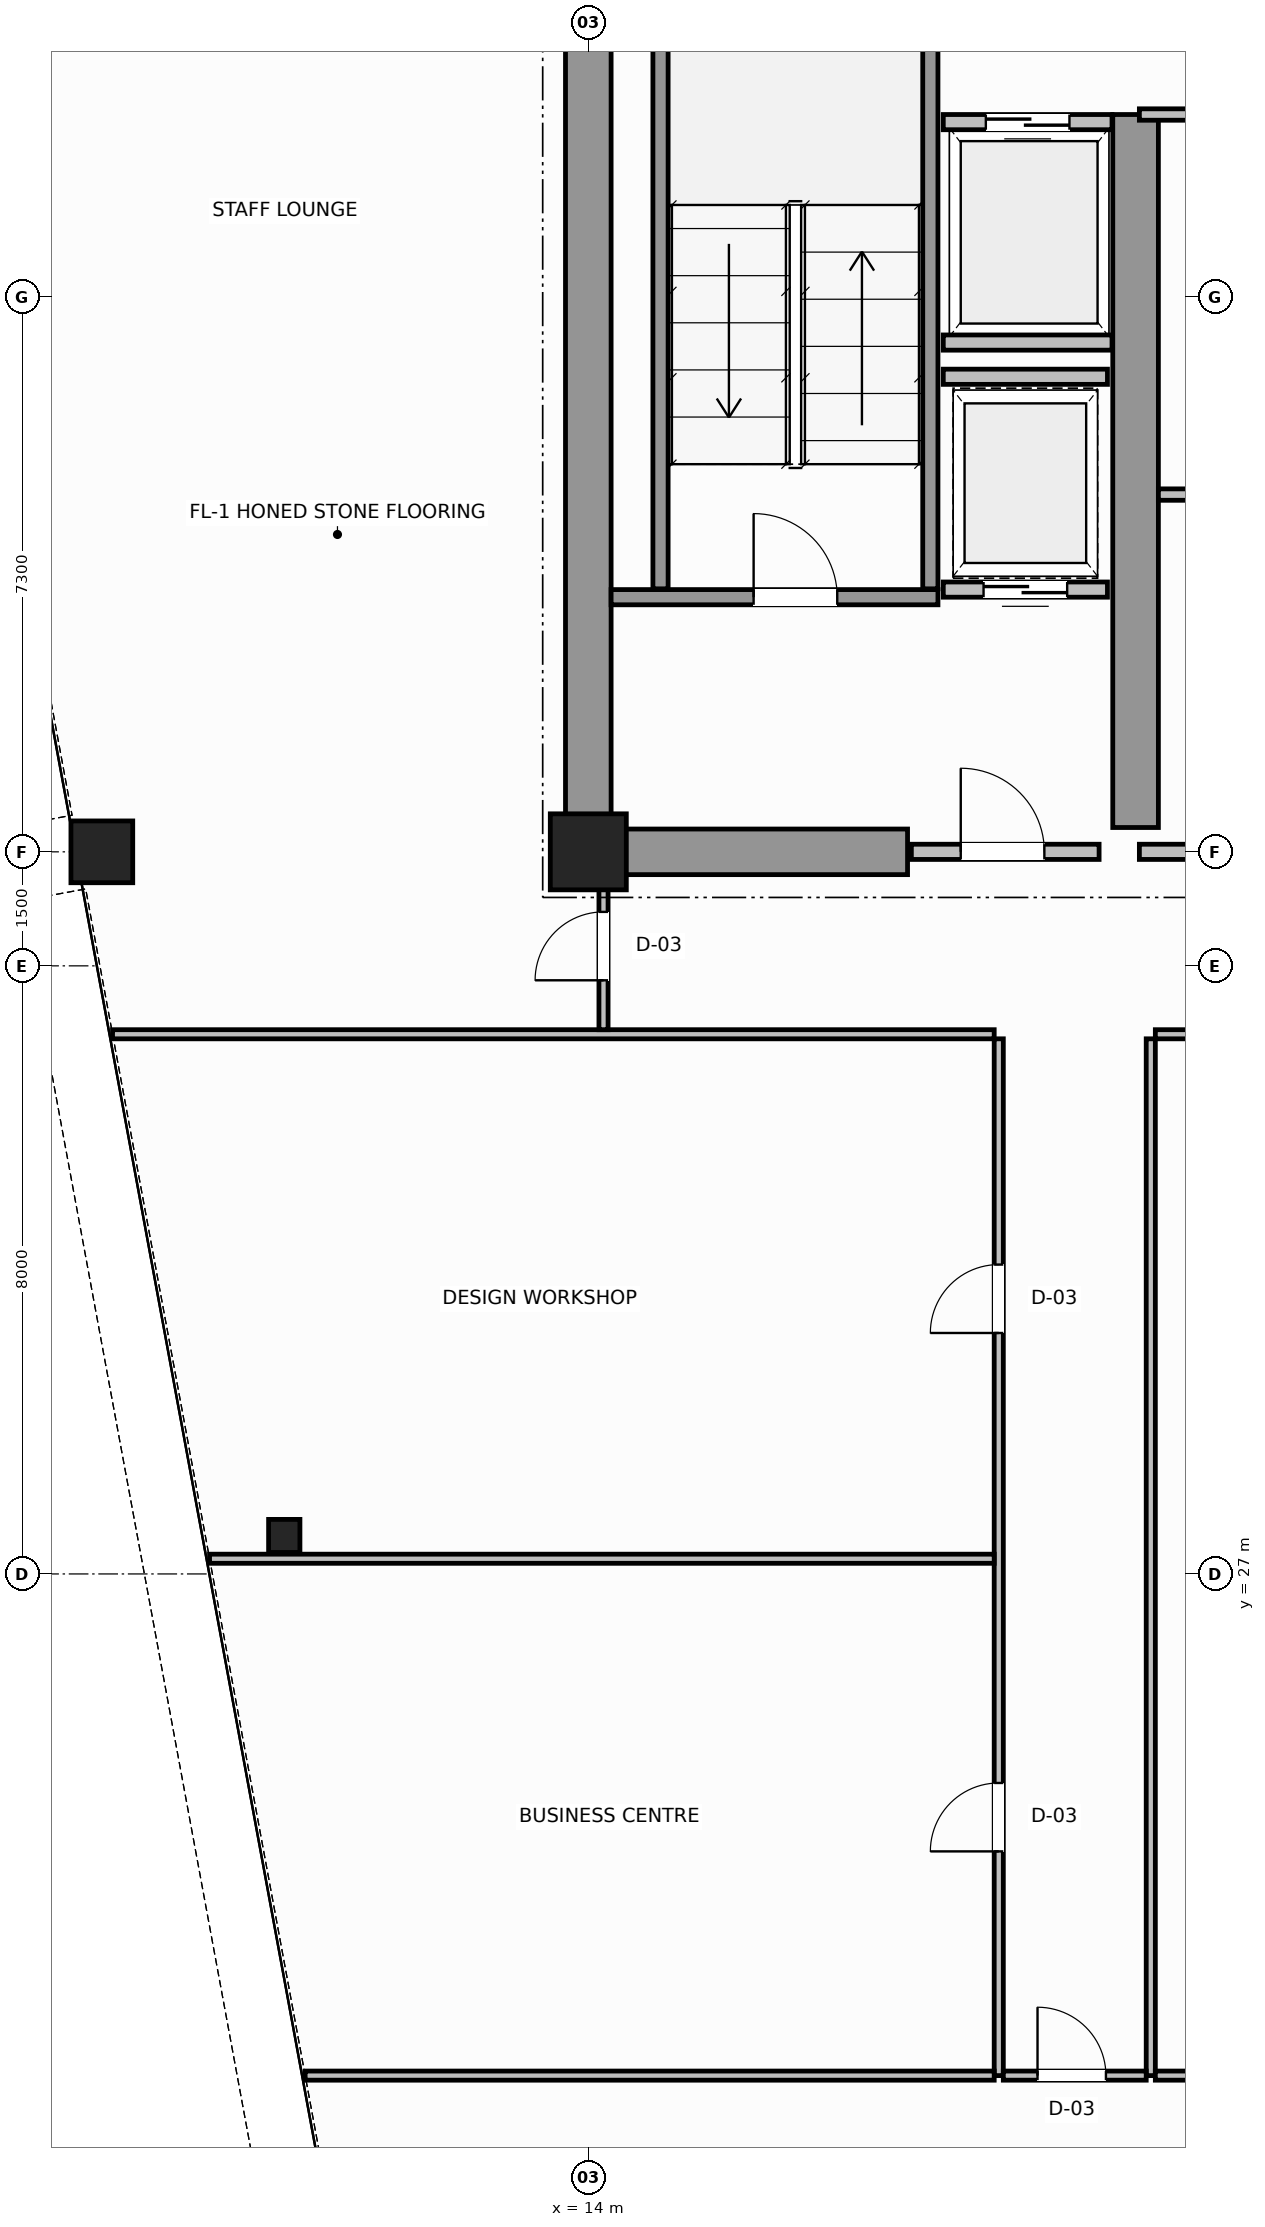
"""IFC4 building model, lengths in metres.
Left out: names, types, materials, properties, quantities, classifications, styles, units other than length and angle.
Written with IfcOpenShell. Run it as: python <this file> out.ifc"""

import sys

from ifc_helpers import new_model, si_unit, direction, frame, frame_2d, origin, origin_2d, place, context, subcontext, project, spatial, rectangle, hollow_circle, i_section, extrude, source, transform, mapped, element, fill, save


model = new_model("IFC4")
c1 = context("Model", 3, precision=1e-05, world=origin(), true_north=direction((0.0, 1.0)))
c2 = subcontext(c1, "Body", "Model", "MODEL_VIEW")
j1 = project(units=[si_unit("LENGTHUNIT", "METRE"), si_unit("PLANEANGLEUNIT", "RADIAN")], contexts=[c1])
p1 = place(None, origin())
s1 = spatial("IfcSite", under=j1, at=p1, CompositionType="ELEMENT")
p2 = place(p1, origin())
s2 = spatial("IfcBuilding", under=s1, at=p2, CompositionType="ELEMENT")
p3 = place(p2, frame((0.0, 0.0, 210.8)))
s3 = spatial("IfcBuildingStorey", under=s2, at=p3, CompositionType="ELEMENT", Elevation=210.8)
m1 = source(origin(), c2, "Body", "SweptSolid", [
    extrude(rectangle(XDim=1.0, YDim=1.0, at=origin_2d()), origin(), (0.0, 0.0, 1.0), 3.8),
])
p4 = place(p3, frame((14.0, 36.5, 0.0), z_axis=(0.0, 0.0, 1.0), x_axis=(1.0, 0.0, 0.0)))
e1 = element("IfcColumn", 1, at=p4, inside=s3, PredefinedType="COLUMN", context=c2, shape_type="MappedRepresentation", body=[
    mapped(m1, transform((0.0, 0.0, 0.0), scale=1.0)),
])
m2 = source(origin(), c2, "Body", "SweptSolid", [
    extrude(hollow_circle(Radius=0.406, WallThickness=0.04, at=origin_2d()), origin(), (0.0, 0.0, 1.0), 3.8),
])
p5 = place(p3, frame((7.6, 36.5, 0.0), z_axis=(0.0, 0.0, 1.0), x_axis=(1.0, 0.0, 0.0)))
e2 = element("IfcColumn", 2, at=p5, inside=s3, PredefinedType="COLUMN", context=c2, shape_type="MappedRepresentation", body=[
    mapped(m2, transform((0.0, 0.0, 0.0), scale=1.0)),
])
m3 = source(origin(), c2, "Body", "SweptSolid", [
    extrude(i_section(OverallWidth=0.412, OverallDepth=0.435, WebThickness=0.036, FlangeThickness=0.05, FilletRadius=0.015, at=origin_2d()), origin(), (0.0, 0.0, 1.0), 3.8),
])
p6 = place(p3, frame((10.0, 27.5, 0.0), z_axis=(0.0, 0.0, 1.0), x_axis=(1.0, 0.0, 0.0)))
e3 = element("IfcColumn", 3, at=p6, inside=s3, PredefinedType="COLUMN", context=c2, shape_type="MappedRepresentation", body=[
    mapped(m3, transform((0.0, 0.0, 0.0), scale=1.0)),
])
p7 = place(p3, frame((14.0, 36.5, 0.0), z_axis=(0.0, 0.0, 1.0), x_axis=(0.0, 1.0, 0.0)))
e4 = element("IfcWall", 4, at=p7, inside=s3, PredefinedType="SHEAR", context=c2, shape_type="SweptSolid", body=[
    extrude(rectangle(XDim=14.5, YDim=0.6, at=frame_2d((7.25, 0.0))), origin(), (0.0, 0.0, 1.0), 3.8),
])
p8 = place(p3, frame((14.32, 36.5, 0.0), z_axis=(0.0, 0.0, 1.0), x_axis=(1.0, 0.0, 0.0)))
e5 = element("IfcWall", 5, at=p8, inside=s3, PredefinedType="SHEAR", context=c2, shape_type="SweptSolid", body=[
    extrude(rectangle(XDim=3.88, YDim=0.6, at=frame_2d((1.94, 0.0))), origin(), (0.0, 0.0, 1.0), 2.58),
])
p9 = place(p3, frame((21.2, 36.82, 0.0), z_axis=(0.0, 0.0, 1.0), x_axis=(0.0, 1.0, 0.0)))
e6 = element("IfcWall", 6, at=p9, inside=s3, PredefinedType="SHEAR", context=c2, shape_type="SweptSolid", body=[
    extrude(rectangle(XDim=9.38, YDim=0.6, at=frame_2d((4.69, 0.0))), origin(), (0.0, 0.0, 1.0), 3.8),
])
p10 = place(p3, frame((14.3, 39.85, 0.0), z_axis=(0.0, 0.0, 1.0), x_axis=(1.0, 0.0, 0.0)))
e7 = element("IfcWall", 7, at=p10, inside=s3, PredefinedType="SOLIDWALL", context=c2, shape_type="SweptSolid", body=[
    extrude(rectangle(XDim=4.3, YDim=0.2, at=frame_2d((2.15, 0.0))), origin(), (0.0, 0.0, 1.0), 3.8),
])
p11 = place(p10, frame((1.875, 0.0, 0.0)))
e8 = element("IfcOpeningElement", 8, at=p11, cuts=e7, PredefinedType="OPENING", context=c2, shape_type="SweptSolid", body=[
    extrude(rectangle(XDim=1.1, YDim=2.15, at=frame_2d((0.55, 1.075))), frame((0.0, 0.11, 0.0), z_axis=(0.0, -1.0, 0.0), x_axis=(1.0, 0.0, 0.0)), (0.0, 0.0, 1.0), 0.22),
])
for number, where, z_axis, x_axis in (
    (9, (14.95, 39.96, 0.0), (0.0, 0.0, 1.0), (0.0, 1.0, 0.0)),
    (10, (18.5, 39.96, 0.0), (0.0, 0.0, 1.0), (0.0, 1.0, 0.0)),
):
    element("IfcWall", number, at=place(p3, frame(where, z_axis=z_axis, x_axis=x_axis)), inside=s3, PredefinedType="SOLIDWALL", context=c2, shape_type="SweptSolid", body=[
        extrude(rectangle(XDim=9.93, YDim=0.2, at=frame_2d((4.965, 0.0))), origin(), (0.0, 0.0, 1.0), 3.8),
    ])
p12 = place(p3, frame((18.25, 36.5, 0.0), z_axis=(0.0, 0.0, 1.0), x_axis=(1.0, 0.0, 0.0)))
e11 = element("IfcWall", 11, at=p12, inside=s3, PredefinedType="SOLIDWALL", context=c2, shape_type="SweptSolid", body=[
    extrude(rectangle(XDim=2.47, YDim=0.2, at=frame_2d((1.235, 0.0))), origin(), (0.0, 0.0, 1.0), 2.57),
])
p13 = place(p12, frame((0.65, 0.0, 0.0)))
e12 = element("IfcOpeningElement", 12, at=p13, cuts=e11, PredefinedType="OPENING", context=c2, shape_type="SweptSolid", body=[
    extrude(rectangle(XDim=1.1, YDim=2.15, at=frame_2d((0.55, 1.075))), frame((0.0, 0.11, 0.0), z_axis=(0.0, -1.0, 0.0), x_axis=(1.0, 0.0, 0.0)), (0.0, 0.0, 1.0), 0.22),
])
p14 = place(p3, frame((18.67, 46.1, 0.0), z_axis=(0.0, 0.0, 1.0), x_axis=(1.0, 0.0, 0.0)))
e13 = element("IfcWall", 13, at=p14, inside=s3, PredefinedType="SOLIDWALL", context=c2, shape_type="SweptSolid", body=[
    extrude(rectangle(XDim=2.22, YDim=0.2, at=frame_2d((1.11, 0.0))), origin(), (0.0, 0.0, 1.0), 3.58),
])
p15 = place(p14, frame((0.56, 0.0, 0.0)))
e14 = element("IfcOpeningElement", 14, at=p15, cuts=e13, PredefinedType="OPENING", context=c2, shape_type="SweptSolid", body=[
    extrude(rectangle(XDim=1.1, YDim=2.15, at=frame_2d((0.55, 1.075))), frame((0.0, 0.11, 0.0), z_axis=(0.0, -1.0, 0.0), x_axis=(1.0, 0.0, 0.0)), (0.0, 0.0, 1.0), 0.22),
])
p16 = place(p3, frame((18.67, 43.2, 0.0), z_axis=(0.0, 0.0, 1.0), x_axis=(1.0, 0.0, 0.0)))
e15 = element("IfcWall", 15, at=p16, inside=s3, PredefinedType="SOLIDWALL", context=c2, shape_type="SweptSolid", body=[
    extrude(rectangle(XDim=2.22, YDim=0.2, at=frame_2d((1.11, 0.0))), origin(), (0.0, 0.0, 1.0), 3.58),
])
p17 = place(p3, frame((18.67, 39.95, 0.0), z_axis=(0.0, 0.0, 1.0), x_axis=(1.0, 0.0, 0.0)))
e16 = element("IfcWall", 16, at=p17, inside=s3, PredefinedType="SOLIDWALL", context=c2, shape_type="SweptSolid", body=[
    extrude(rectangle(XDim=2.16, YDim=0.2, at=frame_2d((1.08, 0.0))), origin(), (0.0, 0.0, 1.0), 3.58),
])
p18 = place(p17, frame((0.53, 0.0, 0.0)))
e17 = element("IfcOpeningElement", 17, at=p18, cuts=e16, PredefinedType="OPENING", context=c2, shape_type="SweptSolid", body=[
    extrude(rectangle(XDim=1.1, YDim=2.15, at=frame_2d((0.55, 1.075))), frame((0.0, 0.11, 0.0), z_axis=(0.0, -1.0, 0.0), x_axis=(1.0, 0.0, 0.0)), (0.0, 0.0, 1.0), 0.22),
])
p19 = place(p3, frame((18.67, 42.75, 0.0), z_axis=(0.0, 0.0, 1.0), x_axis=(1.0, 0.0, 0.0)))
e18 = element("IfcWall", 18, at=p19, inside=s3, PredefinedType="SOLIDWALL", context=c2, shape_type="SweptSolid", body=[
    extrude(rectangle(XDim=2.16, YDim=0.2, at=frame_2d((1.08, 0.0))), origin(), (0.0, 0.0, 1.0), 3.58),
])
p20 = place(p3, frame((21.25, 36.5, 0.0), z_axis=(0.0, 0.0, 1.0), x_axis=(1.0, 0.0, 0.0)))
e19 = element("IfcWall", 19, at=p20, inside=s3, PredefinedType="SOLIDWALL", context=c2, shape_type="SweptSolid", body=[
    extrude(rectangle(XDim=6.27, YDim=0.2, at=frame_2d((3.135, 0.0))), origin(), (0.0, 0.0, 1.0), 2.57),
])
p21 = place(p20, frame((2.6, 0.0, 0.0)))
e20 = element("IfcOpeningElement", 20, at=p21, cuts=e19, PredefinedType="OPENING", context=c2, shape_type="SweptSolid", body=[
    extrude(rectangle(XDim=1.1, YDim=2.15, at=frame_2d((0.55, 1.075))), frame((0.0, 0.11, 0.0), z_axis=(0.0, -1.0, 0.0), x_axis=(1.0, 0.0, 0.0)), (0.0, 0.0, 1.0), 0.22),
])
p22 = place(p3, frame((21.25, 46.2, 0.0), z_axis=(0.0, 0.0, 1.0), x_axis=(1.0, 0.0, 0.0)))
e21 = element("IfcWall", 21, at=p22, inside=s3, PredefinedType="PARTITIONING", context=c2, shape_type="SweptSolid", body=[
    extrude(rectangle(XDim=8.5, YDim=0.15, at=frame_2d((4.25, 0.0))), origin(), (0.0, 0.0, 1.0), 3.58),
])
p23 = place(p3, frame((21.5, 41.2, 0.0), z_axis=(0.0, 0.0, 1.0), x_axis=(1.0, 0.0, 0.0)))
e22 = element("IfcWall", 22, at=p23, inside=s3, PredefinedType="PARTITIONING", context=c2, shape_type="SweptSolid", body=[
    extrude(rectangle(XDim=8.0, YDim=0.15, at=frame_2d((4.0, 0.0))), origin(), (0.0, 0.0, 1.0), 3.58),
])
p24 = place(p23, frame((3.4, 0.0, 0.0)))
e23 = element("IfcOpeningElement", 23, at=p24, cuts=e22, PredefinedType="OPENING", context=c2, shape_type="SweptSolid", body=[
    extrude(rectangle(XDim=0.9, YDim=2.1, at=frame_2d((0.45, 1.05))), frame((0.0, 0.085, 0.0), z_axis=(0.0, -1.0, 0.0), x_axis=(1.0, 0.0, 0.0)), (0.0, 0.0, 1.0), 0.17),
])
p25 = place(p3, frame((21.46, 34.1, 0.0), z_axis=(0.0, 0.0, 1.0), x_axis=(1.0, 0.0, 0.0)))
e24 = element("IfcWall", 24, at=p25, inside=s3, PredefinedType="PARTITIONING", context=c2, shape_type="SweptSolid", body=[
    extrude(rectangle(XDim=25.08, YDim=0.12, at=frame_2d((12.54, 0.0))), origin(), (0.0, 0.0, 1.0), 3.58),
])
p26 = place(p25, frame((5.59, 0.0, 0.0)))
e25 = element("IfcOpeningElement", 25, at=p26, cuts=e24, PredefinedType="OPENING", context=c2, shape_type="SweptSolid", body=[
    extrude(rectangle(XDim=0.9, YDim=2.15, at=frame_2d((0.45, 1.075))), frame((0.0, 0.07, 0.0), z_axis=(0.0, -1.0, 0.0), x_axis=(1.0, 0.0, 0.0)), (0.0, 0.0, 1.0), 0.14),
])
p27 = place(p25, frame((18.19, 0.0, 0.0)))
e26 = element("IfcOpeningElement", 26, at=p27, cuts=e24, PredefinedType="OPENING", context=c2, shape_type="SweptSolid", body=[
    extrude(rectangle(XDim=0.9, YDim=2.15, at=frame_2d((0.45, 1.075))), frame((0.0, 0.07, 0.0), z_axis=(0.0, -1.0, 0.0), x_axis=(1.0, 0.0, 0.0)), (0.0, 0.0, 1.0), 0.14),
])
p28 = place(p3, frame((7.74, 34.1, 0.0), z_axis=(0.0, 0.0, 1.0), x_axis=(1.0, 0.0, 0.0)))
e27 = element("IfcWall", 27, at=p28, inside=s3, PredefinedType="PARTITIONING", context=c2, shape_type="SweptSolid", body=[
    extrude(rectangle(XDim=11.6, YDim=0.12, at=frame_2d((5.8, 0.0))), origin(), (0.0, 0.0, 1.0), 3.58),
])
p29 = place(p3, frame((14.2, 34.16, 0.0), z_axis=(0.0, 0.0, 1.0), x_axis=(0.0, 1.0, 0.0)))
e28 = element("IfcWall", 28, at=p29, inside=s3, PredefinedType="PARTITIONING", context=c2, shape_type="SweptSolid", body=[
    extrude(rectangle(XDim=2.28, YDim=0.12, at=frame_2d((1.14, 0.0))), origin(), (0.0, 0.0, 1.0), 3.58),
])
p30 = place(p29, frame((0.65, 0.0, 0.0)))
e29 = element("IfcOpeningElement", 29, at=p30, cuts=e28, PredefinedType="OPENING", context=c2, shape_type="SweptSolid", body=[
    extrude(rectangle(XDim=0.9, YDim=2.15, at=frame_2d((0.45, 1.075))), frame((0.0, 0.07, 0.0), z_axis=(0.0, -1.0, 0.0), x_axis=(1.0, 0.0, 0.0)), (0.0, 0.0, 1.0), 0.14),
])
p31 = place(p3, frame((19.4, 20.4, 0.0), z_axis=(0.0, 0.0, 1.0), x_axis=(0.0, 1.0, 0.0)))
e30 = element("IfcWall", 30, at=p31, inside=s3, PredefinedType="PARTITIONING", context=c2, shape_type="SweptSolid", body=[
    extrude(rectangle(XDim=13.64, YDim=0.12, at=frame_2d((6.82, 0.0))), origin(), (0.0, 0.0, 1.0), 3.58),
])
p32 = place(p31, frame((2.95, 0.0, 0.0)))
e31 = element("IfcOpeningElement", 31, at=p32, cuts=e30, PredefinedType="OPENING", context=c2, shape_type="SweptSolid", body=[
    extrude(rectangle(XDim=0.9, YDim=2.15, at=frame_2d((0.45, 1.075))), frame((0.0, 0.07, 0.0), z_axis=(0.0, -1.0, 0.0), x_axis=(1.0, 0.0, 0.0)), (0.0, 0.0, 1.0), 0.14),
])
p33 = place(p31, frame((9.77, 0.0, 0.0)))
e32 = element("IfcOpeningElement", 32, at=p33, cuts=e30, PredefinedType="OPENING", context=c2, shape_type="SweptSolid", body=[
    extrude(rectangle(XDim=0.9, YDim=2.15, at=frame_2d((0.45, 1.075))), frame((0.0, 0.07, 0.0), z_axis=(0.0, -1.0, 0.0), x_axis=(1.0, 0.0, 0.0)), (0.0, 0.0, 1.0), 0.14),
])
p34 = place(p3, frame((21.4, 20.4, 0.0), z_axis=(0.0, 0.0, 1.0), x_axis=(0.0, 1.0, 0.0)))
e33 = element("IfcWall", 33, at=p34, inside=s3, PredefinedType="PARTITIONING", context=c2, shape_type="SweptSolid", body=[
    extrude(rectangle(XDim=13.64, YDim=0.12, at=frame_2d((6.82, 0.0))), origin(), (0.0, 0.0, 1.0), 3.58),
])
p35 = place(p3, frame((19.46, 20.4, 0.0), z_axis=(0.0, 0.0, 1.0), x_axis=(1.0, 0.0, 0.0)))
e34 = element("IfcWall", 34, at=p35, inside=s3, PredefinedType="PARTITIONING", context=c2, shape_type="SweptSolid", body=[
    extrude(rectangle(XDim=1.88, YDim=0.12, at=frame_2d((0.94, 0.0))), origin(), (0.0, 0.0, 1.0), 3.58),
])
p36 = place(p35, frame((0.45, 0.0, 0.0)))
e35 = element("IfcOpeningElement", 35, at=p36, cuts=e34, PredefinedType="OPENING", context=c2, shape_type="SweptSolid", body=[
    extrude(rectangle(XDim=0.9, YDim=2.15, at=frame_2d((0.45, 1.075))), frame((0.0, 0.07, 0.0), z_axis=(0.0, -1.0, 0.0), x_axis=(1.0, 0.0, 0.0)), (0.0, 0.0, 1.0), 0.14),
])
p37 = place(p3, frame((10.275, 20.4, 0.0), z_axis=(0.0, 0.0, 1.0), x_axis=(1.0, 0.0, 0.0)))
e36 = element("IfcWall", 36, at=p37, inside=s3, PredefinedType="PARTITIONING", context=c2, shape_type="SweptSolid", body=[
    extrude(rectangle(XDim=9.065, YDim=0.12, at=frame_2d((4.533, 0.0))), origin(), (0.0, 0.0, 1.0), 3.58),
])
p38 = place(p3, frame((9.017, 27.2, 0.0), z_axis=(0.0, 0.0, 1.0), x_axis=(1.0, 0.0, 0.0)))
e37 = element("IfcWall", 37, at=p38, inside=s3, PredefinedType="PARTITIONING", context=c2, shape_type="SweptSolid", body=[
    extrude(rectangle(XDim=10.323, YDim=0.12, at=frame_2d((5.162, 0.0))), origin(), (0.0, 0.0, 1.0), 3.58),
])
p39 = place(p3, frame((21.46, 20.4, 0.0), z_axis=(0.0, 0.0, 1.0), x_axis=(1.0, 0.0, 0.0)))
e38 = element("IfcWall", 38, at=p39, inside=s3, PredefinedType="PARTITIONING", context=c2, shape_type="SweptSolid", body=[
    extrude(rectangle(XDim=25.08, YDim=0.12, at=frame_2d((12.54, 0.0))), origin(), (0.0, 0.0, 1.0), 3.58),
])
m4 = source(origin(), c2, "Body", "SweptSolid", [
    extrude(rectangle(XDim=1.1, YDim=2.15, at=frame_2d((0.55, 1.075))), frame((0.0, 0.025, 0.0), z_axis=(0.0, -1.0, 0.0), x_axis=(1.0, 0.0, 0.0)), (0.0, 0.0, 1.0), 0.05),
])
p40 = place(p11, origin())
e39 = element("IfcDoor", 39, at=p40, inside=s3, OperationType="SINGLE_SWING_LEFT", PredefinedType="DOOR", context=c2, shape_type="MappedRepresentation", body=[
    mapped(m4, transform((0.0, 0.0, 0.0), scale=1.0)),
])
fill(e8, e39)
p41 = place(p13, origin())
e40 = element("IfcDoor", 40, at=p41, inside=s3, OperationType="SINGLE_SWING_RIGHT", PredefinedType="DOOR", context=c2, shape_type="MappedRepresentation", body=[
    mapped(m4, transform((0.0, 0.0, 0.0), scale=1.0)),
])
fill(e12, e40)
p42 = place(p15, origin())
e41 = element("IfcDoor", 41, at=p42, inside=s3, OperationType="DOUBLE_DOOR_SLIDING", PredefinedType="DOOR", context=c2, shape_type="MappedRepresentation", body=[
    mapped(m4, transform((0.0, 0.0, 0.0), scale=1.0)),
])
fill(e14, e41)
p43 = place(p18, origin())
e42 = element("IfcDoor", 42, at=p43, inside=s3, OperationType="DOUBLE_DOOR_SLIDING", PredefinedType="DOOR", context=c2, shape_type="MappedRepresentation", body=[
    mapped(m4, transform((0.0, 0.0, 0.0), scale=1.0)),
])
fill(e17, e42)
m5 = source(origin(), c2, "Body", "SweptSolid", [
    extrude(rectangle(XDim=0.9, YDim=2.15, at=frame_2d((0.45, 1.075))), frame((0.0, 0.025, 0.0), z_axis=(0.0, -1.0, 0.0), x_axis=(1.0, 0.0, 0.0)), (0.0, 0.0, 1.0), 0.05),
])
p44 = place(p30, origin())
e43 = element("IfcDoor", 43, at=p44, inside=s3, OperationType="SINGLE_SWING_LEFT", PredefinedType="DOOR", context=c2, shape_type="MappedRepresentation", body=[
    mapped(m5, transform((0.0, 0.0, 0.0), scale=1.0)),
])
fill(e29, e43)
p45 = place(p32, origin())
e44 = element("IfcDoor", 44, at=p45, inside=s3, OperationType="SINGLE_SWING_LEFT", PredefinedType="DOOR", context=c2, shape_type="MappedRepresentation", body=[
    mapped(m5, transform((0.0, 0.0, 0.0), scale=1.0)),
])
fill(e31, e44)
p46 = place(p33, origin())
e45 = element("IfcDoor", 45, at=p46, inside=s3, OperationType="SINGLE_SWING_RIGHT", PredefinedType="DOOR", context=c2, shape_type="MappedRepresentation", body=[
    mapped(m5, transform((0.0, 0.0, 0.0), scale=1.0)),
])
fill(e32, e45)
p47 = place(p36, origin())
e46 = element("IfcDoor", 46, at=p47, inside=s3, OperationType="SINGLE_SWING_LEFT", PredefinedType="DOOR", context=c2, shape_type="MappedRepresentation", body=[
    mapped(m5, transform((0.0, 0.0, 0.0), scale=1.0)),
])
fill(e35, e46)
save(model, sys.argv[1])
